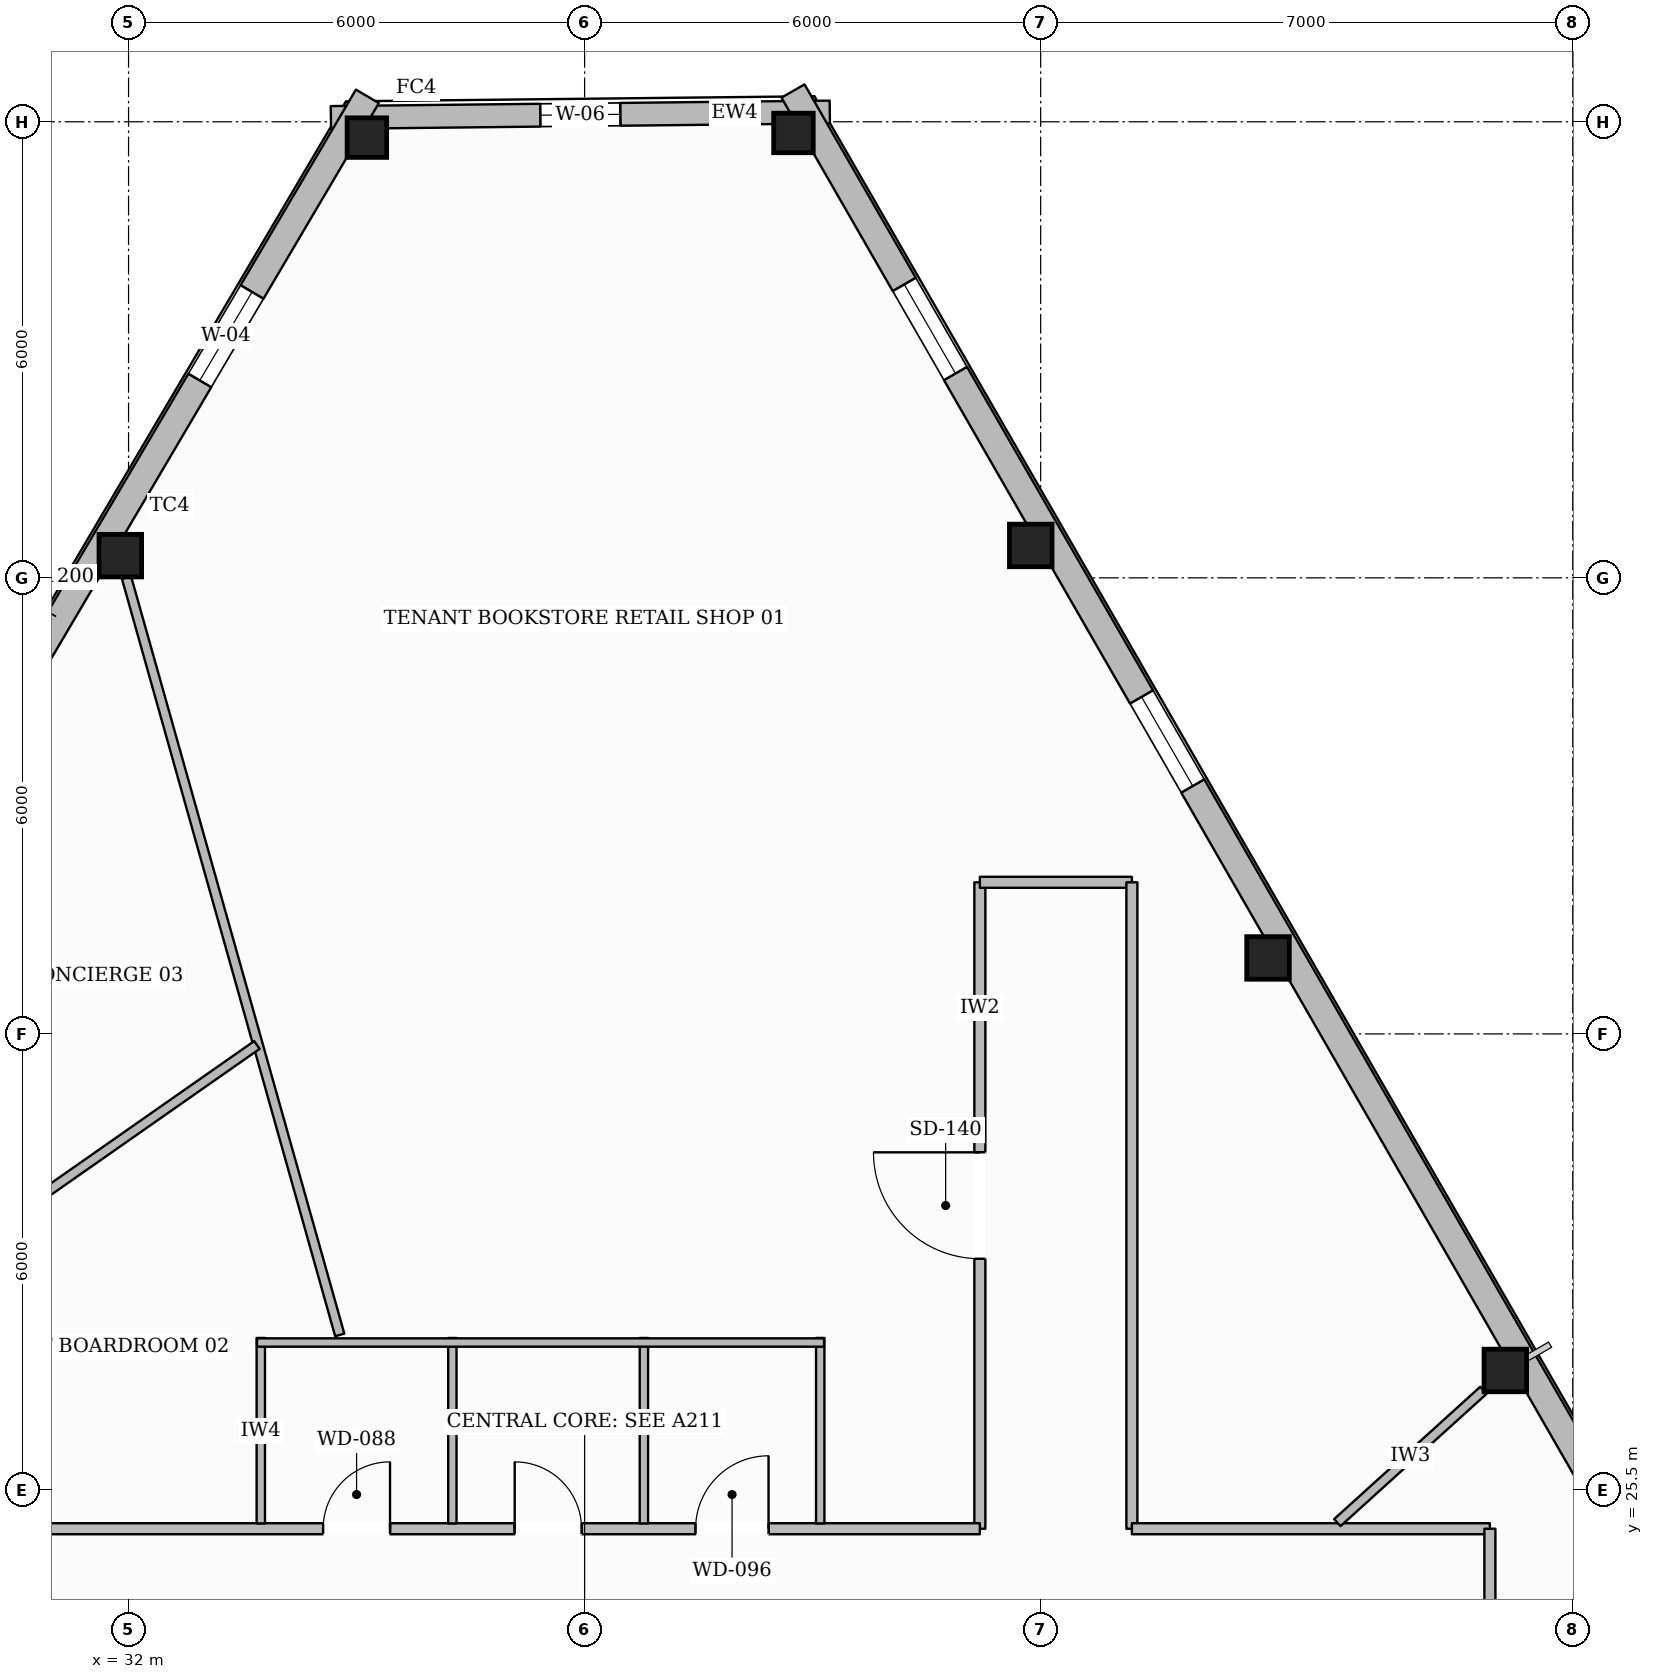
"""IFC4 building model, lengths in metres.
Left out: names, types, materials, properties, quantities, classifications, styles, units other than length and angle.
Written with IfcOpenShell. Run it as: python <this file> out.ifc"""

import sys

from ifc_helpers import new_model, si_unit, direction, frame, frame_2d, origin, origin_2d, place, context, subcontext, project, spatial, rectangle, hollow_rectangle, extrude, element, fill, save


model = new_model("IFC4")
c1 = context("Model", 3, precision=1e-05, world=origin(), true_north=direction((0.0, 1.0)))
c2 = subcontext(c1, "Body", "Model", "MODEL_VIEW")
j1 = project(units=[si_unit("LENGTHUNIT", "METRE"), si_unit("PLANEANGLEUNIT", "RADIAN")], contexts=[c1])
p1 = place(None, origin())
s1 = spatial("IfcSite", under=j1, at=p1, CompositionType="ELEMENT")
p2 = place(p1, origin())
s2 = spatial("IfcBuilding", under=s1, at=p2, CompositionType="ELEMENT")
p3 = place(p2, frame((0.0, 0.0, 285.7)))
s3 = spatial("IfcBuildingStorey", under=s2, at=p3, CompositionType="ELEMENT", Elevation=285.7)
p4 = place(p3, frame((35.136, 43.292, 0.0), z_axis=(0.0, 0.0, 1.0), x_axis=(1.0, 0.0, 0.0)))
e1 = element("IfcColumn", 1, at=p4, inside=s3, PredefinedType="COLUMN", context=c2, shape_type="SweptSolid", body=[
    extrude(hollow_rectangle(XDim=0.52, YDim=0.52, WallThickness=0.024, at=origin_2d()), origin(), (0.0, 0.0, 1.0), 3.61),
])
for number, where, z_axis, x_axis in (
    (2, (31.892, 37.792, 0.0), (0.0, 0.0, 1.0), (1.0, 0.0, 0.0)),
    (3, (50.113, 27.073, 0.0), (0.0, 0.0, 1.0), (1.0, 0.0, 0.0)),
    (4, (46.991, 32.499, 0.0), (0.0, 0.0, 1.0), (1.0, 0.0, 0.0)),
    (5, (43.869, 37.926, 0.0), (0.0, 0.0, 1.0), (1.0, 0.0, 0.0)),
):
    element("IfcColumn", number, at=place(p3, frame(where, z_axis=z_axis, x_axis=x_axis)), inside=s3, PredefinedType="COLUMN", context=c2, shape_type="SweptSolid", body=[
        extrude(hollow_rectangle(XDim=0.56, YDim=0.56, WallThickness=0.025, at=origin_2d()), origin(), (0.0, 0.0, 1.0), 3.61),
    ])
p5 = place(p3, frame((40.748, 43.353, 0.0), z_axis=(0.0, 0.0, 1.0), x_axis=(1.0, 0.0, 0.0)))
e6 = element("IfcColumn", 6, at=p5, inside=s3, PredefinedType="COLUMN", context=c2, shape_type="SweptSolid", body=[
    extrude(hollow_rectangle(XDim=0.52, YDim=0.52, WallThickness=0.024, at=origin_2d()), origin(), (0.0, 0.0, 1.0), 3.61),
])
p6 = place(p3, frame((34.662, 43.556, 0.0), z_axis=(0.0, 0.0, 1.0), x_axis=(0.999940213155, 0.010934812076, 0.0)))
e7 = element("IfcWall", 7, at=p6, inside=s3, PredefinedType="STANDARD", context=c2, shape_type="SweptSolid", body=[
    extrude(rectangle(XDim=6.564, YDim=0.3, at=frame_2d((3.282, 0.0))), origin(), (0.0, 0.0, 1.0), 3.196),
])
p7 = place(p6, frame((2.757, 0.0, 0.65)))
e8 = element("IfcOpeningElement", 8, at=p7, cuts=e7, PredefinedType="OPENING", context=c2, shape_type="SweptSolid", body=[
    extrude(rectangle(XDim=1.05, YDim=1.7, at=frame_2d((0.525, 0.85))), frame((0.0, 0.16, 0.0), z_axis=(0.0, -1.0, 0.0), x_axis=(1.0, 0.0, 0.0)), (0.0, 0.0, 1.0), 0.32),
])
p8 = place(p3, frame((15.195, 10.019, 0.0), z_axis=(0.0, 0.0, 1.0), x_axis=(0.508088294866, 0.861304989316, 0.0)))
e9 = element("IfcWall", 9, at=p8, inside=s3, PredefinedType="STANDARD", context=c2, shape_type="SweptSolid", body=[
    extrude(rectangle(XDim=39.26, YDim=0.35, at=frame_2d((19.63, 0.0))), origin(), (0.0, 0.0, 1.0), 3.196),
])
p9 = place(p8, frame((28.845, 0.0, 0.0)))
e10 = element("IfcOpeningElement", 10, at=p9, cuts=e9, PredefinedType="OPENING", context=c2, shape_type="SweptSolid", body=[
    extrude(rectangle(XDim=1.0, YDim=2.2, at=frame_2d((0.5, 1.1))), frame((0.0, 0.185, 0.0), z_axis=(0.0, -1.0, 0.0), x_axis=(1.0, 0.0, 0.0)), (0.0, 0.0, 1.0), 0.37),
])
p10 = place(p8, frame((34.922, 0.0, 0.65)))
e11 = element("IfcOpeningElement", 11, at=p10, cuts=e9, PredefinedType="OPENING", context=c2, shape_type="SweptSolid", body=[
    extrude(rectangle(XDim=1.35, YDim=1.75, at=frame_2d((0.675, 0.875))), frame((0.0, 0.185, 0.0), z_axis=(0.0, -1.0, 0.0), x_axis=(1.0, 0.0, 0.0)), (0.0, 0.0, 1.0), 0.37),
])
p11 = place(p8, frame((22.152, 0.0, 0.65)))
e12 = element("IfcOpeningElement", 12, at=p11, cuts=e9, PredefinedType="OPENING", context=c2, shape_type="SweptSolid", body=[
    extrude(rectangle(XDim=1.35, YDim=1.75, at=frame_2d((0.675, 0.875))), frame((0.0, 0.185, 0.0), z_axis=(0.0, -1.0, 0.0), x_axis=(1.0, 0.0, 0.0)), (0.0, 0.0, 1.0), 0.37),
])
p12 = place(p8, frame((9.382, 0.0, 0.65)))
e13 = element("IfcOpeningElement", 13, at=p12, cuts=e9, PredefinedType="OPENING", context=c2, shape_type="SweptSolid", body=[
    extrude(rectangle(XDim=1.35, YDim=1.75, at=frame_2d((0.675, 0.875))), frame((0.0, 0.185, 0.0), z_axis=(0.0, -1.0, 0.0), x_axis=(1.0, 0.0, 0.0)), (0.0, 0.0, 1.0), 0.37),
])
p13 = place(p8, frame((2.997, 0.0, 0.65)))
e14 = element("IfcOpeningElement", 14, at=p13, cuts=e9, PredefinedType="OPENING", context=c2, shape_type="SweptSolid", body=[
    extrude(rectangle(XDim=1.35, YDim=1.75, at=frame_2d((0.675, 0.875))), frame((0.0, 0.185, 0.0), z_axis=(0.0, -1.0, 0.0), x_axis=(1.0, 0.0, 0.0)), (0.0, 0.0, 1.0), 0.37),
])
p14 = place(p3, frame((40.742, 43.905, 0.0), z_axis=(0.0, 0.0, 1.0), x_axis=(0.49863744838, -0.866810645454, 0.0)))
e15 = element("IfcWall", 15, at=p14, inside=s3, PredefinedType="STANDARD", context=c2, shape_type="SweptSolid", body=[
    extrude(rectangle(XDim=38.525, YDim=0.35, at=frame_2d((19.262, 0.0))), origin(), (0.0, 0.0, 1.0), 3.196),
])
p15 = place(p14, frame((34.24, 0.0, 0.65)))
e16 = element("IfcOpeningElement", 16, at=p15, cuts=e15, PredefinedType="OPENING", context=c2, shape_type="SweptSolid", body=[
    extrude(rectangle(XDim=1.35, YDim=1.75, at=frame_2d((0.675, 0.875))), frame((0.0, 0.185, 0.0), z_axis=(0.0, -1.0, 0.0), x_axis=(1.0, 0.0, 0.0)), (0.0, 0.0, 1.0), 0.37),
])
p16 = place(p14, frame((27.979, 0.0, 0.65)))
e17 = element("IfcOpeningElement", 17, at=p16, cuts=e15, PredefinedType="OPENING", context=c2, shape_type="SweptSolid", body=[
    extrude(rectangle(XDim=1.35, YDim=1.75, at=frame_2d((0.675, 0.875))), frame((0.0, 0.185, 0.0), z_axis=(0.0, -1.0, 0.0), x_axis=(1.0, 0.0, 0.0)), (0.0, 0.0, 1.0), 0.37),
])
p17 = place(p14, frame((21.719, 0.0, 0.65)))
e18 = element("IfcOpeningElement", 18, at=p17, cuts=e15, PredefinedType="OPENING", context=c2, shape_type="SweptSolid", body=[
    extrude(rectangle(XDim=1.35, YDim=1.75, at=frame_2d((0.675, 0.875))), frame((0.0, 0.185, 0.0), z_axis=(0.0, -1.0, 0.0), x_axis=(1.0, 0.0, 0.0)), (0.0, 0.0, 1.0), 0.37),
])
p18 = place(p14, frame((9.197, 0.0, 0.65)))
e19 = element("IfcOpeningElement", 19, at=p18, cuts=e15, PredefinedType="OPENING", context=c2, shape_type="SweptSolid", body=[
    extrude(rectangle(XDim=1.35, YDim=1.75, at=frame_2d((0.675, 0.875))), frame((0.0, 0.185, 0.0), z_axis=(0.0, -1.0, 0.0), x_axis=(1.0, 0.0, 0.0)), (0.0, 0.0, 1.0), 0.37),
])
p19 = place(p14, frame((2.936, 0.0, 0.65)))
e20 = element("IfcOpeningElement", 20, at=p19, cuts=e15, PredefinedType="OPENING", context=c2, shape_type="SweptSolid", body=[
    extrude(rectangle(XDim=1.35, YDim=1.75, at=frame_2d((0.675, 0.875))), frame((0.0, 0.185, 0.0), z_axis=(0.0, -1.0, 0.0), x_axis=(1.0, 0.0, 0.0)), (0.0, 0.0, 1.0), 0.37),
])
p20 = place(p3, frame((43.2, 24.99, 0.0), z_axis=(0.0, 0.0, 1.0), x_axis=(0.0, 1.0, 0.0)))
e21 = element("IfcWall", 21, at=p20, inside=s3, PredefinedType="PARTITIONING", context=c2, shape_type="SweptSolid", body=[
    extrude(rectangle(XDim=8.504, YDim=0.145, at=frame_2d((4.252, 0.0))), origin(), (0.0, 0.0, 1.0), 3.61),
])
p21 = place(p20, frame((3.552, 0.0, 0.0)))
e22 = element("IfcOpeningElement", 22, at=p21, cuts=e21, PredefinedType="OPENING", context=c2, shape_type="SweptSolid", body=[
    extrude(rectangle(XDim=1.4, YDim=2.2, at=frame_2d((0.7, 1.1))), frame((0.0, 0.083, 0.0), z_axis=(0.0, -1.0, 0.0), x_axis=(1.0, 0.0, 0.0)), (0.0, 0.0, 1.0), 0.165),
])
p22 = place(p3, frame((43.2, 33.494, 0.0), z_axis=(0.0, 0.0, 1.0), x_axis=(1.0, 0.0, 0.0)))
e23 = element("IfcWall", 23, at=p22, inside=s3, PredefinedType="PARTITIONING", context=c2, shape_type="SweptSolid", body=[
    extrude(rectangle(XDim=2.0, YDim=0.145, at=frame_2d((1.0, 0.0))), origin(), (0.0, 0.0, 1.0), 3.61),
])
p23 = place(p3, frame((45.2, 33.494, 0.0), z_axis=(0.0, 0.0, 1.0), x_axis=(0.0, -1.0, 0.0)))
e24 = element("IfcWall", 24, at=p23, inside=s3, PredefinedType="PARTITIONING", context=c2, shape_type="SweptSolid", body=[
    extrude(rectangle(XDim=8.504, YDim=0.145, at=frame_2d((4.252, 0.0))), origin(), (0.0, 0.0, 1.0), 3.61),
])
p24 = place(p3, frame((45.2, 24.99, 0.0), z_axis=(0.0, 0.0, 1.0), x_axis=(1.0, 0.0, 0.0)))
e25 = element("IfcWall", 25, at=p24, inside=s3, PredefinedType="PARTITIONING", context=c2, shape_type="SweptSolid", body=[
    extrude(rectangle(XDim=4.71, YDim=0.145, at=frame_2d((2.355, 0.0))), origin(), (0.0, 0.0, 1.0), 3.61),
])
p25 = place(p3, frame((49.91, 24.99, 0.0), z_axis=(0.0, 0.0, 1.0), x_axis=(0.0, -1.0, 0.0)))
e26 = element("IfcWall", 26, at=p25, inside=s3, PredefinedType="PARTITIONING", context=c2, shape_type="SweptSolid", body=[
    extrude(rectangle(XDim=7.34, YDim=0.145, at=frame_2d((3.67, 0.0))), origin(), (0.0, 0.0, 1.0), 3.349),
])
p26 = place(p25, frame((2.97, 0.0, 0.0)))
e27 = element("IfcOpeningElement", 27, at=p26, cuts=e26, PredefinedType="OPENING", context=c2, shape_type="SweptSolid", body=[
    extrude(rectangle(XDim=1.4, YDim=2.2, at=frame_2d((0.7, 1.1))), frame((0.0, 0.083, 0.0), z_axis=(0.0, -1.0, 0.0), x_axis=(1.0, 0.0, 0.0)), (0.0, 0.0, 1.0), 0.165),
])
p27 = place(p3, frame((26.09, 24.99, 0.0), z_axis=(0.0, 0.0, 1.0), x_axis=(1.0, 0.0, 0.0)))
e28 = element("IfcWall", 28, at=p27, inside=s3, PredefinedType="PARTITIONING", context=c2, shape_type="SweptSolid", body=[
    extrude(rectangle(XDim=17.11, YDim=0.145, at=frame_2d((8.555, 0.0))), origin(), (0.0, 0.0, 1.0), 3.61),
])
p28 = place(p27, frame((8.47, 0.0, 0.0)))
e29 = element("IfcOpeningElement", 29, at=p28, cuts=e28, PredefinedType="OPENING", context=c2, shape_type="SweptSolid", body=[
    extrude(rectangle(XDim=0.88, YDim=2.1, at=frame_2d((0.44, 1.05))), frame((0.0, 0.083, 0.0), z_axis=(0.0, -1.0, 0.0), x_axis=(1.0, 0.0, 0.0)), (0.0, 0.0, 1.0), 0.165),
])
p29 = place(p27, frame((10.99, 0.0, 0.0)))
e30 = element("IfcOpeningElement", 30, at=p29, cuts=e28, PredefinedType="OPENING", context=c2, shape_type="SweptSolid", body=[
    extrude(rectangle(XDim=0.88, YDim=2.1, at=frame_2d((0.44, 1.05))), frame((0.0, 0.083, 0.0), z_axis=(0.0, -1.0, 0.0), x_axis=(1.0, 0.0, 0.0)), (0.0, 0.0, 1.0), 0.165),
])
p30 = place(p27, frame((13.37, 0.0, 0.0)))
e31 = element("IfcOpeningElement", 31, at=p30, cuts=e28, PredefinedType="OPENING", context=c2, shape_type="SweptSolid", body=[
    extrude(rectangle(XDim=0.96, YDim=2.1, at=frame_2d((0.48, 1.05))), frame((0.0, 0.083, 0.0), z_axis=(0.0, -1.0, 0.0), x_axis=(1.0, 0.0, 0.0)), (0.0, 0.0, 1.0), 0.165),
])
p31 = place(p27, frame((3.406, 0.0, 0.0)))
e32 = element("IfcOpeningElement", 32, at=p31, cuts=e28, PredefinedType="OPENING", context=c2, shape_type="SweptSolid", body=[
    extrude(rectangle(XDim=1.02, YDim=2.15, at=frame_2d((0.51, 1.075))), frame((0.0, 0.083, 0.0), z_axis=(0.0, -1.0, 0.0), x_axis=(1.0, 0.0, 0.0)), (0.0, 0.0, 1.0), 0.165),
])
for number, where, z_axis, x_axis in (
    (33, (33.74, 25.06, 0.0), (0.0, 0.0, 1.0), (0.0, 1.0, 0.0)),
    (34, (36.26, 25.06, 0.0), (0.0, 0.0, 1.0), (0.0, 1.0, 0.0)),
    (35, (38.78, 25.06, 0.0), (0.0, 0.0, 1.0), (0.0, 1.0, 0.0)),
    (36, (41.1, 25.06, 0.0), (0.0, 0.0, 1.0), (0.0, 1.0, 0.0)),
):
    element("IfcWall", number, at=place(p3, frame(where, z_axis=z_axis, x_axis=x_axis)), inside=s3, PredefinedType="PLUMBINGWALL", context=c2, shape_type="SweptSolid", body=[
        extrude(rectangle(XDim=2.44, YDim=0.11, at=frame_2d((1.22, 0.0))), origin(), (0.0, 0.0, 1.0), 3.61),
    ])
p32 = place(p3, frame((33.69, 27.44, 0.0), z_axis=(0.0, 0.0, 1.0), x_axis=(1.0, 0.0, 0.0)))
e37 = element("IfcWall", 37, at=p32, inside=s3, PredefinedType="PLUMBINGWALL", context=c2, shape_type="SweptSolid", body=[
    extrude(rectangle(XDim=7.46, YDim=0.11, at=frame_2d((3.73, 0.0))), origin(), (0.0, 0.0, 1.0), 3.61),
])
p33 = place(p3, frame((47.903, 25.071, 0.0), z_axis=(0.0, 0.0, 1.0), x_axis=(0.741169905223, 0.671317489413, 0.0)))
e38 = element("IfcWall", 38, at=p33, inside=s3, PredefinedType="PARTITIONING", context=c2, shape_type="SweptSolid", body=[
    extrude(rectangle(XDim=2.593, YDim=0.125, at=frame_2d((1.297, 0.0))), origin(), (0.0, 0.0, 1.0), 3.61),
])
p34 = place(p3, frame((34.779, 27.54, 0.0), z_axis=(0.0, 0.0, 1.0), x_axis=(-0.271059057767, 0.962562718581, 0.0)))
e39 = element("IfcWall", 39, at=p34, inside=s3, PredefinedType="PARTITIONING", context=c2, shape_type="SweptSolid", body=[
    extrude(rectangle(XDim=10.352, YDim=0.125, at=frame_2d((5.176, 0.0))), origin(), (0.0, 0.0, 1.0), 3.61),
])
p35 = place(p3, frame((33.689, 31.354, 0.0), z_axis=(0.0, 0.0, 1.0), x_axis=(-0.819358941252, -0.573280843384, 0.0)))
e40 = element("IfcWall", 40, at=p35, inside=s3, PredefinedType="PARTITIONING", context=c2, shape_type="SweptSolid", body=[
    extrude(rectangle(XDim=11.917, YDim=0.125, at=frame_2d((5.959, 0.0))), origin(), (0.0, 0.0, 1.0), 3.199),
])
p36 = place(p35, frame((5.554, 0.0, 0.0)))
e41 = element("IfcOpeningElement", 41, at=p36, cuts=e40, PredefinedType="OPENING", context=c2, shape_type="SweptSolid", body=[
    extrude(rectangle(XDim=0.98, YDim=2.15, at=frame_2d((0.49, 1.075))), frame((0.0, 0.073, 0.0), z_axis=(0.0, -1.0, 0.0), x_axis=(1.0, 0.0, 0.0)), (0.0, 0.0, 1.0), 0.145),
])
p37 = place(p10, origin())
e42 = element("IfcWindow", 42, at=p37, inside=s3, PartitioningType="SINGLE_PANEL", PredefinedType="WINDOW", context=c2, shape_type="SweptSolid", body=[
    extrude(rectangle(XDim=1.35, YDim=1.75, at=frame_2d((0.675, 0.875))), frame((0.0, 0.03, 0.0), z_axis=(0.0, -1.0, 0.0), x_axis=(1.0, 0.0, 0.0)), (0.0, 0.0, 1.0), 0.06),
])
fill(e11, e42)
p38 = place(p18, origin())
e43 = element("IfcWindow", 43, at=p38, inside=s3, PartitioningType="SINGLE_PANEL", PredefinedType="WINDOW", context=c2, shape_type="SweptSolid", body=[
    extrude(rectangle(XDim=1.35, YDim=1.75, at=frame_2d((0.675, 0.875))), frame((0.0, 0.03, 0.0), z_axis=(0.0, -1.0, 0.0), x_axis=(1.0, 0.0, 0.0)), (0.0, 0.0, 1.0), 0.06),
])
fill(e19, e43)
p39 = place(p19, origin())
e44 = element("IfcWindow", 44, at=p39, inside=s3, PartitioningType="SINGLE_PANEL", PredefinedType="WINDOW", context=c2, shape_type="SweptSolid", body=[
    extrude(rectangle(XDim=1.35, YDim=1.75, at=frame_2d((0.675, 0.875))), frame((0.0, 0.03, 0.0), z_axis=(0.0, -1.0, 0.0), x_axis=(1.0, 0.0, 0.0)), (0.0, 0.0, 1.0), 0.06),
])
fill(e20, e44)
p40 = place(p7, origin())
e45 = element("IfcWindow", 45, at=p40, inside=s3, PartitioningType="SINGLE_PANEL", PredefinedType="WINDOW", context=c2, shape_type="SweptSolid", body=[
    extrude(rectangle(XDim=1.05, YDim=1.7, at=frame_2d((0.525, 0.85))), frame((0.0, 0.03, 0.0), z_axis=(0.0, -1.0, 0.0), x_axis=(1.0, 0.0, 0.0)), (0.0, 0.0, 1.0), 0.06),
])
fill(e8, e45)
p41 = place(p28, origin())
e46 = element("IfcDoor", 46, at=p41, inside=s3, OperationType="SINGLE_SWING_RIGHT", PredefinedType="DOOR", context=c2, shape_type="SweptSolid", body=[
    extrude(rectangle(XDim=0.88, YDim=2.1, at=frame_2d((0.44, 1.05))), frame((0.0, 0.025, 0.0), z_axis=(0.0, -1.0, 0.0), x_axis=(1.0, 0.0, 0.0)), (0.0, 0.0, 1.0), 0.05),
])
fill(e29, e46)
p42 = place(p29, origin())
e47 = element("IfcDoor", 47, at=p42, inside=s3, OperationType="SINGLE_SWING_LEFT", PredefinedType="DOOR", context=c2, shape_type="SweptSolid", body=[
    extrude(rectangle(XDim=0.88, YDim=2.1, at=frame_2d((0.44, 1.05))), frame((0.0, 0.025, 0.0), z_axis=(0.0, -1.0, 0.0), x_axis=(1.0, 0.0, 0.0)), (0.0, 0.0, 1.0), 0.05),
])
fill(e30, e47)
p43 = place(p30, origin())
e48 = element("IfcDoor", 48, at=p43, inside=s3, OperationType="SINGLE_SWING_RIGHT", PredefinedType="DOOR", context=c2, shape_type="SweptSolid", body=[
    extrude(rectangle(XDim=0.96, YDim=2.1, at=frame_2d((0.48, 1.05))), frame((0.0, 0.025, 0.0), z_axis=(0.0, -1.0, 0.0), x_axis=(1.0, 0.0, 0.0)), (0.0, 0.0, 1.0), 0.05),
])
fill(e31, e48)
p44 = place(p21, origin())
e49 = element("IfcDoor", 49, at=p44, inside=s3, OperationType="SINGLE_SWING_RIGHT", PredefinedType="DOOR", context=c2, shape_type="SweptSolid", body=[
    extrude(rectangle(XDim=1.4, YDim=2.2, at=frame_2d((0.7, 1.1))), frame((0.0, 0.025, 0.0), z_axis=(0.0, -1.0, 0.0), x_axis=(1.0, 0.0, 0.0)), (0.0, 0.0, 1.0), 0.05),
])
fill(e22, e49)
save(model, sys.argv[1])
